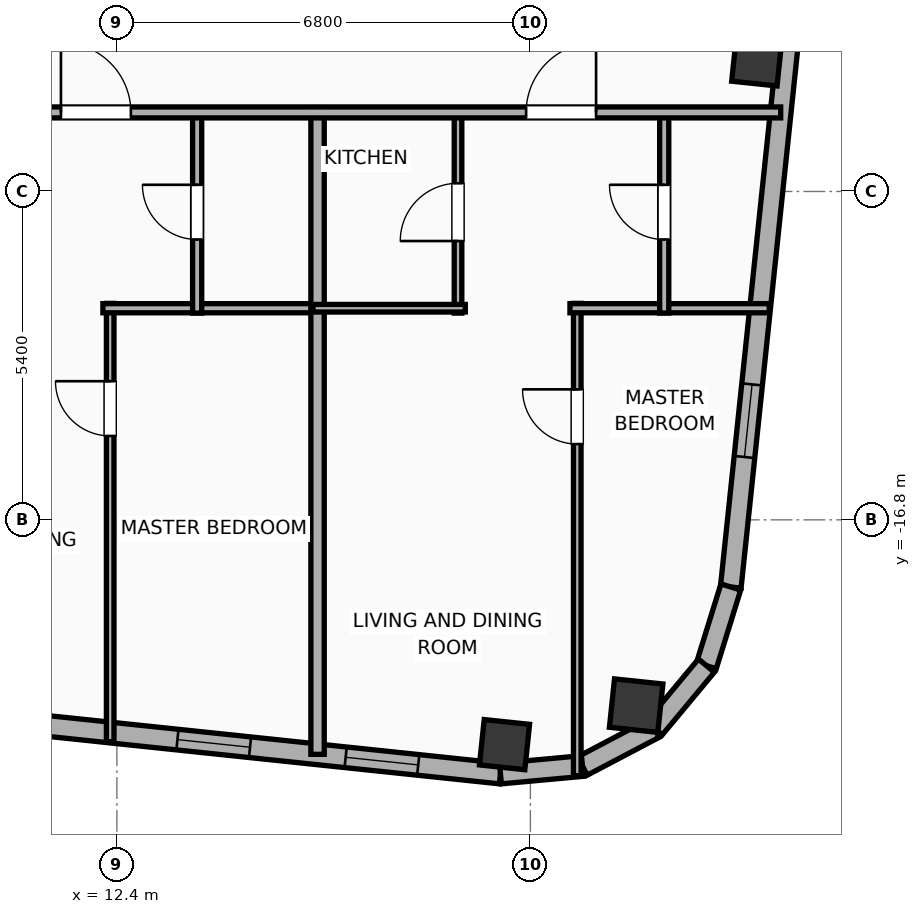
"""IFC4 building model, lengths in metres.
Left out: names, types, materials, properties, quantities, classifications, styles, units other than length and angle.
Written with IfcOpenShell. Run it as: python <this file> out.ifc"""

import sys

from ifc_helpers import new_model, si_unit, direction, frame, frame_2d, origin, origin_2d, place, context, subcontext, project, spatial, rectangle, hollow_rectangle, hollow_circle, extrude, element, fill, save


model = new_model("IFC4")
c1 = context("Model", 3, precision=1e-05, world=origin(), true_north=direction((0.0, 1.0)))
c2 = subcontext(c1, "Body", "Model", "MODEL_VIEW")
j1 = project(units=[si_unit("LENGTHUNIT", "METRE"), si_unit("PLANEANGLEUNIT", "RADIAN")], contexts=[c1])
p1 = place(None, origin())
s1 = spatial("IfcSite", under=j1, at=p1, CompositionType="ELEMENT")
p2 = place(p1, origin())
s2 = spatial("IfcBuilding", under=s1, at=p2, CompositionType="ELEMENT")
p3 = place(p2, frame((0.0, 0.0, 299.0)))
s3 = spatial("IfcBuildingStorey", under=s2, at=p3, CompositionType="ELEMENT", Elevation=299.0)
p4 = place(p3, frame((18.775, -20.497, 0.0), z_axis=(0.0, 0.0, 1.0), x_axis=(0.994521895368, -0.104528463268, 0.0)))
e1 = element("IfcColumn", 1, at=p4, inside=s3, PredefinedType="COLUMN", context=c2, shape_type="SweptSolid", body=[
    extrude(hollow_rectangle(XDim=0.75, YDim=0.75, WallThickness=0.025, at=origin_2d()), origin(), (0.0, 0.0, 1.0), 3.9),
])
p5 = place(p3, frame((20.939, -19.855, 0.0), z_axis=(0.0, 0.0, 1.0), x_axis=(0.994521895368, -0.104528463268, 0.0)))
e2 = element("IfcColumn", 2, at=p5, inside=s3, PredefinedType="COLUMN", context=c2, shape_type="SweptSolid", body=[
    extrude(hollow_circle(Radius=0.4, WallThickness=0.028, at=origin_2d()), origin(), (0.0, 0.0, 1.0), 3.9),
])
p6 = place(p3, frame((22.923, -9.252, 0.0), z_axis=(0.0, 0.0, 1.0), x_axis=(0.994521895368, -0.104528463268, 0.0)))
e3 = element("IfcColumn", 3, at=p6, inside=s3, PredefinedType="COLUMN", context=c2, shape_type="SweptSolid", body=[
    extrude(hollow_rectangle(XDim=0.75, YDim=0.75, WallThickness=0.025, at=origin_2d()), origin(), (0.0, 0.0, 1.0), 3.9),
])
p7 = place(p3, frame((18.708, -20.972, 0.0), z_axis=(0.0, 0.0, 1.0), x_axis=(-0.994521888554, 0.104528528102, 0.0)))
e4 = element("IfcWall", 4, at=p7, inside=s3, PredefinedType="ELEMENTEDWALL", context=c2, shape_type="SweptSolid", body=[
    extrude(rectangle(XDim=46.766, YDim=0.34, at=frame_2d((23.383, 0.0))), origin(), (0.0, 0.0, 1.0), 3.635),
])
p8 = place(p7, frame((23.733, 0.0, 0.65)))
e5 = element("IfcOpeningElement", 5, at=p8, cuts=e4, PredefinedType="OPENING", context=c2, shape_type="SweptSolid", body=[
    extrude(rectangle(XDim=2.6, YDim=2.45, at=frame_2d((1.3, 1.225))), frame((0.0, 0.18, 0.0), z_axis=(0.0, -1.0, 0.0), x_axis=(1.0, 0.0, 0.0)), (0.0, 0.0, 1.0), 0.36),
])
p9 = place(p7, frame((44.402, 0.0, 0.75)))
e6 = element("IfcOpeningElement", 6, at=p9, cuts=e4, PredefinedType="OPENING", context=c2, shape_type="SweptSolid", body=[
    extrude(rectangle(XDim=1.2, YDim=2.05, at=frame_2d((0.6, 1.025))), frame((0.0, 0.18, 0.0), z_axis=(0.0, -1.0, 0.0), x_axis=(1.0, 0.0, 0.0)), (0.0, 0.0, 1.0), 0.36),
])
p10 = place(p7, frame((39.553, 0.0, 0.75)))
e7 = element("IfcOpeningElement", 7, at=p10, cuts=e4, PredefinedType="OPENING", context=c2, shape_type="SweptSolid", body=[
    extrude(rectangle(XDim=1.2, YDim=2.05, at=frame_2d((0.6, 1.025))), frame((0.0, 0.18, 0.0), z_axis=(0.0, -1.0, 0.0), x_axis=(1.0, 0.0, 0.0)), (0.0, 0.0, 1.0), 0.36),
])
p11 = place(p7, frame((42.419, 0.0, 0.75)))
e8 = element("IfcOpeningElement", 8, at=p11, cuts=e4, PredefinedType="OPENING", context=c2, shape_type="SweptSolid", body=[
    extrude(rectangle(XDim=1.2, YDim=2.05, at=frame_2d((0.6, 1.025))), frame((0.0, 0.18, 0.0), z_axis=(0.0, -1.0, 0.0), x_axis=(1.0, 0.0, 0.0)), (0.0, 0.0, 1.0), 0.36),
])
p12 = place(p7, frame((34.933, 0.0, 0.75)))
e9 = element("IfcOpeningElement", 9, at=p12, cuts=e4, PredefinedType="OPENING", context=c2, shape_type="SweptSolid", body=[
    extrude(rectangle(XDim=1.2, YDim=2.05, at=frame_2d((0.6, 1.025))), frame((0.0, 0.18, 0.0), z_axis=(0.0, -1.0, 0.0), x_axis=(1.0, 0.0, 0.0)), (0.0, 0.0, 1.0), 0.36),
])
p13 = place(p7, frame((28.692, 0.0, 0.75)))
e10 = element("IfcOpeningElement", 10, at=p13, cuts=e4, PredefinedType="OPENING", context=c2, shape_type="SweptSolid", body=[
    extrude(rectangle(XDim=1.2, YDim=2.05, at=frame_2d((0.6, 1.025))), frame((0.0, 0.18, 0.0), z_axis=(0.0, -1.0, 0.0), x_axis=(1.0, 0.0, 0.0)), (0.0, 0.0, 1.0), 0.36),
])
p14 = place(p7, frame((30.957, 0.0, 0.75)))
e11 = element("IfcOpeningElement", 11, at=p14, cuts=e4, PredefinedType="OPENING", context=c2, shape_type="SweptSolid", body=[
    extrude(rectangle(XDim=1.2, YDim=2.05, at=frame_2d((0.6, 1.025))), frame((0.0, 0.18, 0.0), z_axis=(0.0, -1.0, 0.0), x_axis=(1.0, 0.0, 0.0)), (0.0, 0.0, 1.0), 0.36),
])
p15 = place(p7, frame((7.492, 0.0, 0.75)))
e12 = element("IfcOpeningElement", 12, at=p15, cuts=e4, PredefinedType="OPENING", context=c2, shape_type="SweptSolid", body=[
    extrude(rectangle(XDim=1.2, YDim=2.05, at=frame_2d((0.6, 1.025))), frame((0.0, 0.18, 0.0), z_axis=(0.0, -1.0, 0.0), x_axis=(1.0, 0.0, 0.0)), (0.0, 0.0, 1.0), 0.36),
])
p16 = place(p7, frame((4.141, 0.0, 0.75)))
e13 = element("IfcOpeningElement", 13, at=p16, cuts=e4, PredefinedType="OPENING", context=c2, shape_type="SweptSolid", body=[
    extrude(rectangle(XDim=1.2, YDim=2.05, at=frame_2d((0.6, 1.025))), frame((0.0, 0.18, 0.0), z_axis=(0.0, -1.0, 0.0), x_axis=(1.0, 0.0, 0.0)), (0.0, 0.0, 1.0), 0.36),
])
p17 = place(p7, frame((1.36, 0.0, 0.75)))
e14 = element("IfcOpeningElement", 14, at=p17, cuts=e4, PredefinedType="OPENING", context=c2, shape_type="SweptSolid", body=[
    extrude(rectangle(XDim=1.2, YDim=2.05, at=frame_2d((0.6, 1.025))), frame((0.0, 0.18, 0.0), z_axis=(0.0, -1.0, 0.0), x_axis=(1.0, 0.0, 0.0)), (0.0, 0.0, 1.0), 0.36),
])
p18 = place(p7, frame((20.254, 0.0, 0.75)))
e15 = element("IfcOpeningElement", 15, at=p18, cuts=e4, PredefinedType="OPENING", context=c2, shape_type="SweptSolid", body=[
    extrude(rectangle(XDim=1.2, YDim=2.05, at=frame_2d((0.6, 1.025))), frame((0.0, 0.18, 0.0), z_axis=(0.0, -1.0, 0.0), x_axis=(1.0, 0.0, 0.0)), (0.0, 0.0, 1.0), 0.36),
])
p19 = place(p7, frame((16.172, 0.0, 0.75)))
e16 = element("IfcOpeningElement", 16, at=p19, cuts=e4, PredefinedType="OPENING", context=c2, shape_type="SweptSolid", body=[
    extrude(rectangle(XDim=1.2, YDim=2.05, at=frame_2d((0.6, 1.025))), frame((0.0, 0.18, 0.0), z_axis=(0.0, -1.0, 0.0), x_axis=(1.0, 0.0, 0.0)), (0.0, 0.0, 1.0), 0.36),
])
p20 = place(p7, frame((12.11, 0.0, 0.75)))
e17 = element("IfcOpeningElement", 17, at=p20, cuts=e4, PredefinedType="OPENING", context=c2, shape_type="SweptSolid", body=[
    extrude(rectangle(XDim=1.2, YDim=2.05, at=frame_2d((0.6, 1.025))), frame((0.0, 0.18, 0.0), z_axis=(0.0, -1.0, 0.0), x_axis=(1.0, 0.0, 0.0)), (0.0, 0.0, 1.0), 0.36),
])
p21 = place(p3, frame((25.67, 12.296, 0.0), z_axis=(0.0, 0.0, 1.0), x_axis=(-0.104533282919, -0.994521388791, 0.0)))
e18 = element("IfcWall", 18, at=p21, inside=s3, PredefinedType="ELEMENTEDWALL", context=c2, shape_type="SweptSolid", body=[
    extrude(rectangle(XDim=30.366, YDim=0.34, at=frame_2d((15.183, 0.0))), origin(), (0.0, 0.0, 1.0), 3.635),
])
p22 = place(p21, frame((5.442, 0.0, 0.65)))
e19 = element("IfcOpeningElement", 19, at=p22, cuts=e18, PredefinedType="OPENING", context=c2, shape_type="SweptSolid", body=[
    extrude(rectangle(XDim=2.6, YDim=2.45, at=frame_2d((1.3, 1.225))), frame((0.0, 0.18, 0.0), z_axis=(0.0, -1.0, 0.0), x_axis=(1.0, 0.0, 0.0)), (0.0, 0.0, 1.0), 0.36),
])
p23 = place(p21, frame((27.017, 0.0, 0.75)))
e20 = element("IfcOpeningElement", 20, at=p23, cuts=e18, PredefinedType="OPENING", context=c2, shape_type="SweptSolid", body=[
    extrude(rectangle(XDim=1.2, YDim=2.05, at=frame_2d((0.6, 1.025))), frame((0.0, 0.18, 0.0), z_axis=(0.0, -1.0, 0.0), x_axis=(1.0, 0.0, 0.0)), (0.0, 0.0, 1.0), 0.36),
])
p24 = place(p21, frame((17.829, 0.0, 0.75)))
e21 = element("IfcOpeningElement", 21, at=p24, cuts=e18, PredefinedType="OPENING", context=c2, shape_type="SweptSolid", body=[
    extrude(rectangle(XDim=1.2, YDim=2.05, at=frame_2d((0.6, 1.025))), frame((0.0, 0.18, 0.0), z_axis=(0.0, -1.0, 0.0), x_axis=(1.0, 0.0, 0.0)), (0.0, 0.0, 1.0), 0.36),
])
p25 = place(p3, frame((22.496, -17.905, 0.0), z_axis=(0.0, 0.0, 1.0), x_axis=(-0.296416228123, -0.955058856671, 0.0)))
e22 = element("IfcWall", 22, at=p25, inside=s3, PredefinedType="ELEMENTEDWALL", context=c2, shape_type="SweptSolid", body=[
    extrude(rectangle(XDim=1.354, YDim=0.34, at=frame_2d((0.677, 0.0))), origin(), (0.0, 0.0, 1.0), 3.635),
])
p26 = place(p3, frame((22.094, -19.198, 0.0), z_axis=(0.0, 0.0, 1.0), x_axis=(-0.639501603217, -0.768789762863, 0.0)))
e23 = element("IfcWall", 23, at=p26, inside=s3, PredefinedType="ELEMENTEDWALL", context=c2, shape_type="SweptSolid", body=[
    extrude(rectangle(XDim=1.337, YDim=0.34, at=frame_2d((0.668, 0.0))), origin(), (0.0, 0.0, 1.0), 3.635),
])
p27 = place(p3, frame((21.24, -20.226, 0.0), z_axis=(0.0, 0.0, 1.0), x_axis=(-0.884922182678, -0.465738908193, 0.0)))
e24 = element("IfcWall", 24, at=p27, inside=s3, PredefinedType="ELEMENTEDWALL", context=c2, shape_type="SweptSolid", body=[
    extrude(rectangle(XDim=1.337, YDim=0.34, at=frame_2d((0.668, 0.0))), origin(), (0.0, 0.0, 1.0), 3.635),
])
p28 = place(p3, frame((20.056, -20.848, 0.0), z_axis=(0.0, 0.0, 1.0), x_axis=(-0.995813013343, -0.091413579172, 0.0)))
e25 = element("IfcWall", 25, at=p28, inside=s3, PredefinedType="ELEMENTEDWALL", context=c2, shape_type="SweptSolid", body=[
    extrude(rectangle(XDim=1.354, YDim=0.34, at=frame_2d((0.677, 0.0))), origin(), (0.0, 0.0, 1.0), 3.635),
])
p29 = place(p3, frame((12.29, -20.448, 0.0), z_axis=(0.0, 0.0, 1.0), x_axis=(0.0, 1.0, 0.0)))
e26 = element("IfcWall", 26, at=p29, inside=s3, PredefinedType="PARTITIONING", context=c2, shape_type="SweptSolid", body=[
    extrude(rectangle(XDim=7.208, YDim=0.125, at=frame_2d((3.604, 0.0))), origin(), (0.0, 0.0, 1.0), 3.635),
])
p30 = place(p29, frame((5.028, 0.0, 0.0)))
e27 = element("IfcOpeningElement", 27, at=p30, cuts=e26, PredefinedType="OPENING", context=c2, shape_type="SweptSolid", body=[
    extrude(rectangle(XDim=0.9, YDim=2.05, at=frame_2d((0.45, 1.025))), frame((0.0, 0.073, 0.0), z_axis=(0.0, -1.0, 0.0), x_axis=(1.0, 0.0, 0.0)), (0.0, 0.0, 1.0), 0.145),
])
p31 = place(p3, frame((12.17, -13.32, 0.0), z_axis=(0.0, 0.0, 1.0), x_axis=(1.0, 0.0, 0.0)))
e28 = element("IfcWall", 28, at=p31, inside=s3, PredefinedType="PLUMBINGWALL", context=c2, shape_type="SweptSolid", body=[
    extrude(rectangle(XDim=3.605, YDim=0.15, at=frame_2d((1.802, 0.0))), origin(), (0.0, 0.0, 1.0), 3.635),
])
p32 = place(p3, frame((13.72, -13.4, 0.0), z_axis=(0.0, 0.0, 1.0), x_axis=(0.0, 1.0, 0.0)))
e29 = element("IfcWall", 29, at=p32, inside=s3, PredefinedType="PLUMBINGWALL", context=c2, shape_type="SweptSolid", body=[
    extrude(rectangle(XDim=3.32, YDim=0.15, at=frame_2d((1.66, 0.0))), origin(), (0.0, 0.0, 1.0), 3.635),
])
p33 = place(p32, frame((1.21, 0.0, 0.0)))
e30 = element("IfcOpeningElement", 30, at=p33, cuts=e29, PredefinedType="OPENING", context=c2, shape_type="SweptSolid", body=[
    extrude(rectangle(XDim=0.9, YDim=2.05, at=frame_2d((0.45, 1.025))), frame((0.0, 0.085, 0.0), z_axis=(0.0, -1.0, 0.0), x_axis=(1.0, 0.0, 0.0)), (0.0, 0.0, 1.0), 0.17),
])
p34 = place(p3, frame((15.7, -20.656, 0.0), z_axis=(0.0, 0.0, 1.0), x_axis=(0.0, 1.0, 0.0)))
e31 = element("IfcWall", 31, at=p34, inside=s3, PredefinedType="PARTITIONING", context=c2, shape_type="SweptSolid", body=[
    extrude(rectangle(XDim=10.636, YDim=0.22, at=frame_2d((5.318, 0.0))), origin(), (0.0, 0.0, 1.0), 3.635),
])
p35 = place(p3, frame((19.971, -21.007, 0.0), z_axis=(0.0, 0.0, 1.0), x_axis=(0.0, 1.0, 0.0)))
e32 = element("IfcWall", 32, at=p35, inside=s3, PredefinedType="PARTITIONING", context=c2, shape_type="SweptSolid", body=[
    extrude(rectangle(XDim=7.767, YDim=0.125, at=frame_2d((3.883, 0.0))), origin(), (0.0, 0.0, 1.0), 3.635),
])
p36 = place(p35, frame((5.453, 0.0, 0.0)))
e33 = element("IfcOpeningElement", 33, at=p36, cuts=e32, PredefinedType="OPENING", context=c2, shape_type="SweptSolid", body=[
    extrude(rectangle(XDim=0.9, YDim=2.05, at=frame_2d((0.45, 1.025))), frame((0.0, 0.073, 0.0), z_axis=(0.0, -1.0, 0.0), x_axis=(1.0, 0.0, 0.0)), (0.0, 0.0, 1.0), 0.145),
])
p37 = place(p3, frame((19.851, -13.32, 0.0), z_axis=(0.0, 0.0, 1.0), x_axis=(1.0, 0.0, 0.0)))
e34 = element("IfcWall", 34, at=p37, inside=s3, PredefinedType="PLUMBINGWALL", context=c2, shape_type="SweptSolid", body=[
    extrude(rectangle(XDim=3.278, YDim=0.15, at=frame_2d((1.639, 0.0))), origin(), (0.0, 0.0, 1.0), 3.635),
])
p38 = place(p3, frame((18.01, -13.4, 0.0), z_axis=(0.0, 0.0, 1.0), x_axis=(0.0, 1.0, 0.0)))
e35 = element("IfcWall", 35, at=p38, inside=s3, PredefinedType="PARTITIONING", context=c2, shape_type="SweptSolid", body=[
    extrude(rectangle(XDim=3.32, YDim=0.125, at=frame_2d((1.66, 0.0))), origin(), (0.0, 0.0, 1.0), 3.635),
])
p39 = place(p38, frame((1.185, 0.0, 0.0)))
e36 = element("IfcOpeningElement", 36, at=p39, cuts=e35, PredefinedType="OPENING", context=c2, shape_type="SweptSolid", body=[
    extrude(rectangle(XDim=0.95, YDim=2.05, at=frame_2d((0.475, 1.025))), frame((0.0, 0.073, 0.0), z_axis=(0.0, -1.0, 0.0), x_axis=(1.0, 0.0, 0.0)), (0.0, 0.0, 1.0), 0.145),
])
p40 = place(p3, frame((15.625, -13.32, 0.0), z_axis=(0.0, 0.0, 1.0), x_axis=(1.0, 0.0, 0.0)))
e37 = element("IfcWall", 37, at=p40, inside=s3, PredefinedType="PARTITIONING", context=c2, shape_type="SweptSolid", body=[
    extrude(rectangle(XDim=2.505, YDim=0.125, at=frame_2d((1.252, 0.0))), origin(), (0.0, 0.0, 1.0), 3.635),
])
p41 = place(p3, frame((21.401, -13.4, 0.0), z_axis=(0.0, 0.0, 1.0), x_axis=(0.0, 1.0, 0.0)))
e38 = element("IfcWall", 38, at=p41, inside=s3, PredefinedType="PLUMBINGWALL", context=c2, shape_type="SweptSolid", body=[
    extrude(rectangle(XDim=3.32, YDim=0.15, at=frame_2d((1.66, 0.0))), origin(), (0.0, 0.0, 1.0), 3.635),
])
p42 = place(p41, frame((1.21, 0.0, 0.0)))
e39 = element("IfcOpeningElement", 39, at=p42, cuts=e38, PredefinedType="OPENING", context=c2, shape_type="SweptSolid", body=[
    extrude(rectangle(XDim=0.9, YDim=2.05, at=frame_2d((0.45, 1.025))), frame((0.0, 0.085, 0.0), z_axis=(0.0, -1.0, 0.0), x_axis=(1.0, 0.0, 0.0)), (0.0, 0.0, 1.0), 0.17),
])
p43 = place(p3, frame((8.08, -10.1, 0.0), z_axis=(0.0, 0.0, 1.0), x_axis=(1.0, 0.0, 0.0)))
e40 = element("IfcWall", 40, at=p43, inside=s3, PredefinedType="PARTITIONING", context=c2, shape_type="SweptSolid", body=[
    extrude(rectangle(XDim=15.236, YDim=0.18, at=frame_2d((7.618, 0.0))), origin(), (0.0, 0.0, 1.0), 3.635),
])
p44 = place(p43, frame((3.4, 0.0, 0.0)))
e41 = element("IfcOpeningElement", 41, at=p44, cuts=e40, PredefinedType="OPENING", context=c2, shape_type="SweptSolid", body=[
    extrude(rectangle(XDim=1.15, YDim=2.05, at=frame_2d((0.575, 1.025))), frame((0.0, 0.1, 0.0), z_axis=(0.0, -1.0, 0.0), x_axis=(1.0, 0.0, 0.0)), (0.0, 0.0, 1.0), 0.2),
])
p45 = place(p43, frame((11.05, 0.0, 0.0)))
e42 = element("IfcOpeningElement", 42, at=p45, cuts=e40, PredefinedType="OPENING", context=c2, shape_type="SweptSolid", body=[
    extrude(rectangle(XDim=1.15, YDim=2.05, at=frame_2d((0.575, 1.025))), frame((0.0, 0.1, 0.0), z_axis=(0.0, -1.0, 0.0), x_axis=(1.0, 0.0, 0.0)), (0.0, 0.0, 1.0), 0.2),
])
p46 = place(p16, origin())
e43 = element("IfcWindow", 43, at=p46, inside=s3, PartitioningType="SINGLE_PANEL", PredefinedType="WINDOW", context=c2, shape_type="SweptSolid", body=[
    extrude(rectangle(XDim=1.2, YDim=2.05, at=frame_2d((0.6, 1.025))), frame((0.0, 0.03, 0.0), z_axis=(0.0, -1.0, 0.0), x_axis=(1.0, 0.0, 0.0)), (0.0, 0.0, 1.0), 0.06),
])
fill(e13, e43)
p47 = place(p17, origin())
e44 = element("IfcWindow", 44, at=p47, inside=s3, PartitioningType="SINGLE_PANEL", PredefinedType="WINDOW", context=c2, shape_type="SweptSolid", body=[
    extrude(rectangle(XDim=1.2, YDim=2.05, at=frame_2d((0.6, 1.025))), frame((0.0, 0.03, 0.0), z_axis=(0.0, -1.0, 0.0), x_axis=(1.0, 0.0, 0.0)), (0.0, 0.0, 1.0), 0.06),
])
fill(e14, e44)
p48 = place(p23, origin())
e45 = element("IfcWindow", 45, at=p48, inside=s3, PartitioningType="SINGLE_PANEL", PredefinedType="WINDOW", context=c2, shape_type="SweptSolid", body=[
    extrude(rectangle(XDim=1.2, YDim=2.05, at=frame_2d((0.6, 1.025))), frame((0.0, 0.03, 0.0), z_axis=(0.0, -1.0, 0.0), x_axis=(1.0, 0.0, 0.0)), (0.0, 0.0, 1.0), 0.06),
])
fill(e20, e45)
p49 = place(p30, origin())
e46 = element("IfcDoor", 46, at=p49, inside=s3, OperationType="SINGLE_SWING_RIGHT", PredefinedType="DOOR", context=c2, shape_type="SweptSolid", body=[
    extrude(rectangle(XDim=0.9, YDim=2.05, at=frame_2d((0.45, 1.025))), frame((0.0, 0.025, 0.0), z_axis=(0.0, -1.0, 0.0), x_axis=(1.0, 0.0, 0.0)), (0.0, 0.0, 1.0), 0.05),
])
fill(e27, e46)
p50 = place(p33, origin())
e47 = element("IfcDoor", 47, at=p50, inside=s3, OperationType="SINGLE_SWING_RIGHT", PredefinedType="DOOR", context=c2, shape_type="SweptSolid", body=[
    extrude(rectangle(XDim=0.9, YDim=2.05, at=frame_2d((0.45, 1.025))), frame((0.0, 0.025, 0.0), z_axis=(0.0, -1.0, 0.0), x_axis=(1.0, 0.0, 0.0)), (0.0, 0.0, 1.0), 0.05),
])
fill(e30, e47)
p51 = place(p36, origin())
e48 = element("IfcDoor", 48, at=p51, inside=s3, OperationType="SINGLE_SWING_RIGHT", PredefinedType="DOOR", context=c2, shape_type="SweptSolid", body=[
    extrude(rectangle(XDim=0.9, YDim=2.05, at=frame_2d((0.45, 1.025))), frame((0.0, 0.025, 0.0), z_axis=(0.0, -1.0, 0.0), x_axis=(1.0, 0.0, 0.0)), (0.0, 0.0, 1.0), 0.05),
])
fill(e33, e48)
p52 = place(p39, origin())
e49 = element("IfcDoor", 49, at=p52, inside=s3, OperationType="SINGLE_SWING_LEFT", PredefinedType="DOOR", context=c2, shape_type="SweptSolid", body=[
    extrude(rectangle(XDim=0.95, YDim=2.05, at=frame_2d((0.475, 1.025))), frame((0.0, 0.025, 0.0), z_axis=(0.0, -1.0, 0.0), x_axis=(1.0, 0.0, 0.0)), (0.0, 0.0, 1.0), 0.05),
])
fill(e36, e49)
p53 = place(p42, origin())
e50 = element("IfcDoor", 50, at=p53, inside=s3, OperationType="SINGLE_SWING_RIGHT", PredefinedType="DOOR", context=c2, shape_type="SweptSolid", body=[
    extrude(rectangle(XDim=0.9, YDim=2.05, at=frame_2d((0.45, 1.025))), frame((0.0, 0.025, 0.0), z_axis=(0.0, -1.0, 0.0), x_axis=(1.0, 0.0, 0.0)), (0.0, 0.0, 1.0), 0.05),
])
fill(e39, e50)
p54 = place(p44, origin())
e51 = element("IfcDoor", 51, at=p54, inside=s3, OperationType="SINGLE_SWING_LEFT", PredefinedType="DOOR", context=c2, shape_type="SweptSolid", body=[
    extrude(rectangle(XDim=1.15, YDim=2.05, at=frame_2d((0.575, 1.025))), frame((0.0, 0.025, 0.0), z_axis=(0.0, -1.0, 0.0), x_axis=(1.0, 0.0, 0.0)), (0.0, 0.0, 1.0), 0.05),
])
fill(e41, e51)
p55 = place(p45, origin())
e52 = element("IfcDoor", 52, at=p55, inside=s3, OperationType="SINGLE_SWING_RIGHT", PredefinedType="DOOR", context=c2, shape_type="SweptSolid", body=[
    extrude(rectangle(XDim=1.15, YDim=2.05, at=frame_2d((0.575, 1.025))), frame((0.0, 0.025, 0.0), z_axis=(0.0, -1.0, 0.0), x_axis=(1.0, 0.0, 0.0)), (0.0, 0.0, 1.0), 0.05),
])
fill(e42, e52)
save(model, sys.argv[1])
